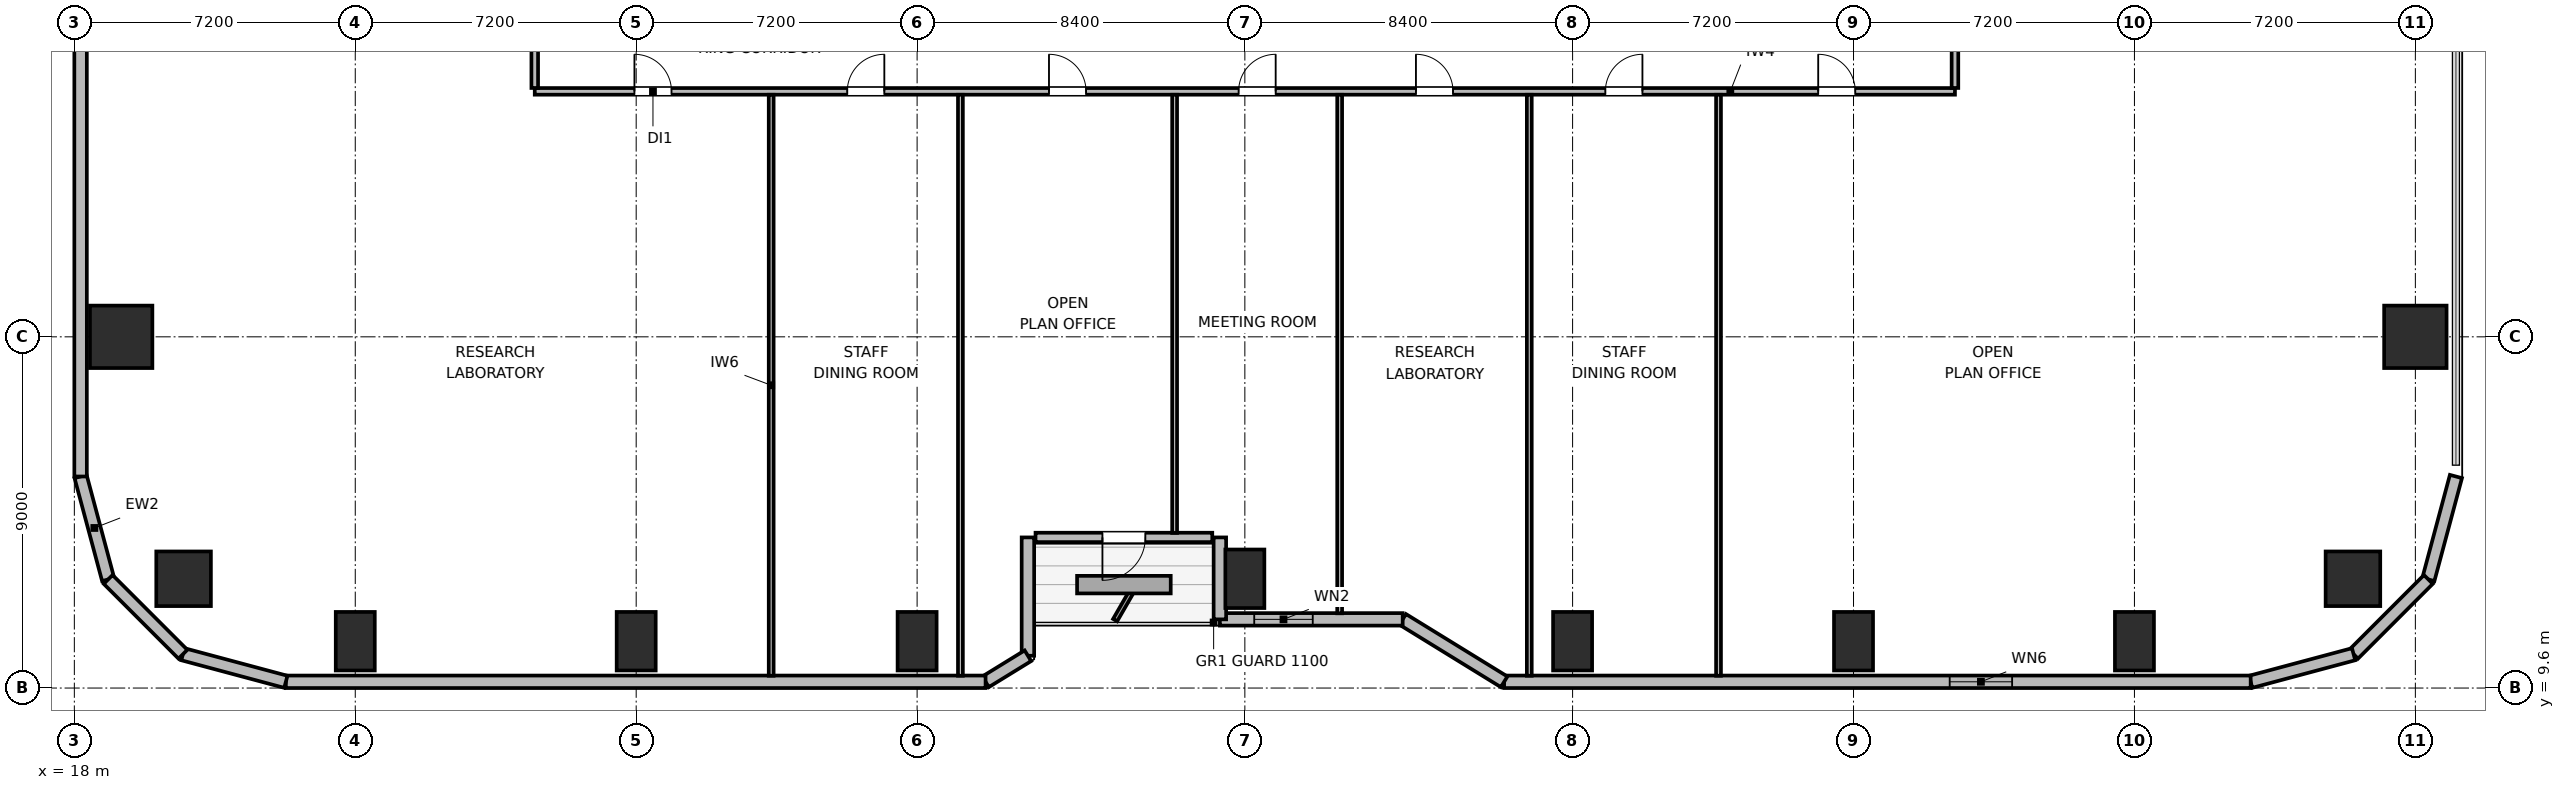
"""IFC4 building model, lengths in metres.
Left out: names, types, materials, properties, quantities, classifications, styles, units other than length and angle.
Written with IfcOpenShell. Run it as: python <this file> out.ifc"""

import sys

from ifc_helpers import new_model, si_unit, direction, frame, frame_2d, origin, origin_2d, place, context, subcontext, project, spatial, rectangle, circle, extrude, element, fill, save


model = new_model("IFC4")
c1 = context("Model", 3, precision=1e-05, world=origin(), true_north=direction((0.0, 1.0)))
c2 = subcontext(c1, "Body", "Model", "MODEL_VIEW")
j1 = project(units=[si_unit("LENGTHUNIT", "METRE"), si_unit("PLANEANGLEUNIT", "RADIAN")], contexts=[c1])
p1 = place(None, origin())
s1 = spatial("IfcSite", under=j1, at=p1, CompositionType="ELEMENT")
p2 = place(p1, origin())
s2 = spatial("IfcBuilding", under=s1, at=p2, CompositionType="ELEMENT")
p3 = place(p2, frame((0.0, 0.0, 45.0)))
s3 = spatial("IfcBuildingStorey", under=s2, at=p3, CompositionType="ELEMENT", Elevation=45.0)
for number, where, z_axis, x_axis in (
    (1, (20.8, 12.4, 0.0), (0.0, 0.0, 1.0), (1.0, 0.0, 0.0)),
    (2, (76.4, 12.4, 0.0), (0.0, 0.0, 1.0), (1.0, 0.0, 0.0)),
):
    element("IfcColumn", number, at=place(p3, frame(where, z_axis=z_axis, x_axis=x_axis)), inside=s3, PredefinedType="COLUMN", context=c2, shape_type="SweptSolid", body=[
        extrude(circle(Radius=0.7, at=origin_2d()), origin(), (0.0, 0.0, 1.0), 3.9),
    ])
for number, where, z_axis, x_axis in (
    (3, (25.2, 10.8, 0.0), (0.0, 0.0, 1.0), (1.0, 0.0, 0.0)),
    (4, (32.4, 10.8, 0.0), (0.0, 0.0, 1.0), (1.0, 0.0, 0.0)),
    (5, (39.6, 10.8, 0.0), (0.0, 0.0, 1.0), (1.0, 0.0, 0.0)),
    (6, (48.0, 12.4, 0.0), (0.0, 0.0, 1.0), (1.0, 0.0, 0.0)),
    (7, (56.4, 10.8, 0.0), (0.0, 0.0, 1.0), (1.0, 0.0, 0.0)),
    (8, (63.6, 10.8, 0.0), (0.0, 0.0, 1.0), (1.0, 0.0, 0.0)),
    (9, (70.8, 10.8, 0.0), (0.0, 0.0, 1.0), (1.0, 0.0, 0.0)),
):
    element("IfcColumn", number, at=place(p3, frame(where, z_axis=z_axis, x_axis=x_axis)), inside=s3, PredefinedType="COLUMN", context=c2, shape_type="SweptSolid", body=[
        extrude(rectangle(XDim=1.0, YDim=1.5, at=origin_2d()), origin(), (0.0, 0.0, 1.0), 3.9),
    ])
for number, where, z_axis, x_axis in (
    (10, (19.2, 18.6, 0.0), (0.0, 0.0, 1.0), (1.0, 0.0, 0.0)),
    (11, (78.0, 18.6, 0.0), (0.0, 0.0, 1.0), (1.0, 0.0, 0.0)),
):
    element("IfcColumn", number, at=place(p3, frame(where, z_axis=z_axis, x_axis=x_axis)), inside=s3, PredefinedType="COLUMN", context=c2, shape_type="SweptSolid", body=[
        extrude(rectangle(XDim=1.6, YDim=1.6, at=origin_2d()), origin(), (0.0, 0.0, 1.0), 3.9),
    ])
p4 = place(p3, frame((18.866, 12.383, 0.0), z_axis=(0.0, 0.0, 1.0), x_axis=(-0.25869736047, 0.965958423373, 0.0)))
e12 = element("IfcWall", 12, at=p4, inside=s3, PredefinedType="SOLIDWALL", context=c2, shape_type="SweptSolid", body=[
    extrude(rectangle(XDim=2.731, YDim=0.32, at=frame_2d((1.366, 0.0))), origin(), (0.0, 0.0, 1.0), 3.64),
])
p5 = place(p3, frame((18.16, 15.021, 0.0), z_axis=(0.0, 0.0, 1.0), x_axis=(0.0, 1.0, 0.0)))
e13 = element("IfcWall", 13, at=p5, inside=s3, PredefinedType="SOLIDWALL", context=c2, shape_type="SweptSolid", body=[
    extrude(rectangle(XDim=14.219, YDim=0.32, at=frame_2d((7.109, 0.0))), origin(), (0.0, 0.0, 1.0), 3.64),
])
p6 = place(p3, frame((79.04, 15.021, 0.0), z_axis=(0.0, 0.0, 1.0), x_axis=(-0.25869736047, -0.965958423373, 0.0)))
e14 = element("IfcWall", 14, at=p6, inside=s3, PredefinedType="SOLIDWALL", context=c2, shape_type="SweptSolid", body=[
    extrude(rectangle(XDim=2.731, YDim=0.32, at=frame_2d((1.366, 0.0))), origin(), (0.0, 0.0, 1.0), 3.64),
])
p7 = place(p3, frame((78.333, 12.383, 0.0), z_axis=(0.0, 0.0, 1.0), x_axis=(-0.707106781187, -0.707106781187, 0.0)))
e15 = element("IfcWall", 15, at=p7, inside=s3, PredefinedType="SOLIDWALL", context=c2, shape_type="SweptSolid", body=[
    extrude(rectangle(XDim=2.71, YDim=0.32, at=frame_2d((1.355, 0.0))), origin(), (0.0, 0.0, 1.0), 3.64),
])
p8 = place(p3, frame((76.417, 10.467, 0.0), z_axis=(0.0, 0.0, 1.0), x_axis=(-0.965964405026, -0.25867502435, 0.0)))
e16 = element("IfcWall", 16, at=p8, inside=s3, PredefinedType="SOLIDWALL", context=c2, shape_type="SweptSolid", body=[
    extrude(rectangle(XDim=2.731, YDim=0.32, at=frame_2d((1.366, 0.0))), origin(), (0.0, 0.0, 1.0), 3.64),
])
p9 = place(p3, frame((73.779, 9.76, 0.0), z_axis=(0.0, 0.0, 1.0), x_axis=(-1.0, 0.0, 0.0)))
e17 = element("IfcWall", 17, at=p9, inside=s3, PredefinedType="SOLIDWALL", context=c2, shape_type="SweptSolid", body=[
    extrude(rectangle(XDim=19.134, YDim=0.32, at=frame_2d((9.567, 0.0))), origin(), (0.0, 0.0, 1.0), 3.64),
])
p10 = place(p9, frame((6.114, 0.0, 0.85)))
e18 = element("IfcOpeningElement", 18, at=p10, cuts=e17, PredefinedType="OPENING", context=c2, shape_type="SweptSolid", body=[
    extrude(rectangle(XDim=1.6, YDim=1.0, at=frame_2d((0.8, 0.5))), frame((0.0, 0.17, 0.0), z_axis=(0.0, -1.0, 0.0), x_axis=(1.0, 0.0, 0.0)), (0.0, 0.0, 1.0), 0.34),
])
p11 = place(p3, frame((54.645, 9.76, 0.0), z_axis=(0.0, 0.0, 1.0), x_axis=(-0.851630857047, 0.524142044989, 0.0)))
e19 = element("IfcWall", 19, at=p11, inside=s3, PredefinedType="SOLIDWALL", context=c2, shape_type="SweptSolid", body=[
    extrude(rectangle(XDim=3.053, YDim=0.32, at=frame_2d((1.526, 0.0))), origin(), (0.0, 0.0, 1.0), 2.875),
])
p12 = place(p3, frame((52.045, 11.36, 0.0), z_axis=(0.0, 0.0, 1.0), x_axis=(-1.0, 0.0, 0.0)))
e20 = element("IfcWall", 20, at=p12, inside=s3, PredefinedType="SOLIDWALL", context=c2, shape_type="SweptSolid", body=[
    extrude(rectangle(XDim=4.685, YDim=0.32, at=frame_2d((2.343, 0.0))), origin(), (0.0, 0.0, 1.0), 2.875),
])
p13 = place(p12, frame((2.305, 0.0, 0.85)))
e21 = element("IfcOpeningElement", 21, at=p13, cuts=e20, PredefinedType="OPENING", context=c2, shape_type="SweptSolid", body=[
    extrude(rectangle(XDim=1.5, YDim=1.1, at=frame_2d((0.75, 0.55))), frame((0.0, 0.17, 0.0), z_axis=(0.0, -1.0, 0.0), x_axis=(1.0, 0.0, 0.0)), (0.0, 0.0, 1.0), 0.34),
])
p14 = place(p3, frame((47.36, 11.36, 0.0), z_axis=(0.0, 0.0, 1.0), x_axis=(0.0, 1.0, 0.0)))
e22 = element("IfcWall", 22, at=p14, inside=s3, PredefinedType="SOLIDWALL", context=c2, shape_type="SweptSolid", body=[
    extrude(rectangle(XDim=2.1, YDim=0.32, at=frame_2d((1.05, 0.0))), origin(), (0.0, 0.0, 1.0), 2.875),
])
p15 = place(p3, frame((47.165, 13.46, 0.0), z_axis=(0.0, 0.0, 1.0), x_axis=(-1.0, 0.0, 0.0)))
e23 = element("IfcWall", 23, at=p15, inside=s3, PredefinedType="SOLIDWALL", context=c2, shape_type="SweptSolid", body=[
    extrude(rectangle(XDim=4.53, YDim=0.24, at=frame_2d((2.265, 0.0))), origin(), (0.0, 0.0, 1.0), 3.64),
])
p16 = place(p15, frame((1.715, 0.0, 0.0)))
e24 = element("IfcOpeningElement", 24, at=p16, cuts=e23, PredefinedType="OPENING", context=c2, shape_type="SweptSolid", body=[
    extrude(rectangle(XDim=1.1, YDim=2.04, at=frame_2d((0.55, 1.02))), frame((0.0, 0.13, 0.0), z_axis=(0.0, -1.0, 0.0), x_axis=(1.0, 0.0, 0.0)), (0.0, 0.0, 1.0), 0.26),
])
p17 = place(p3, frame((42.44, 13.46, 0.0), z_axis=(0.0, 0.0, 1.0), x_axis=(0.0, -1.0, 0.0)))
e25 = element("IfcWall", 25, at=p17, inside=s3, PredefinedType="SOLIDWALL", context=c2, shape_type="SweptSolid", body=[
    extrude(rectangle(XDim=3.032, YDim=0.32, at=frame_2d((1.516, 0.0))), origin(), (0.0, 0.0, 1.0), 2.875),
])
p18 = place(p3, frame((42.44, 10.427, 0.0), z_axis=(0.0, 0.0, 1.0), x_axis=(-0.851776724646, -0.523904964045, 0.0)))
e26 = element("IfcWall", 26, at=p18, inside=s3, PredefinedType="SOLIDWALL", context=c2, shape_type="SweptSolid", body=[
    extrude(rectangle(XDim=1.274, YDim=0.32, at=frame_2d((0.637, 0.0))), origin(), (0.0, 0.0, 1.0), 3.64),
])
p19 = place(p3, frame((41.355, 9.76, 0.0), z_axis=(0.0, 0.0, 1.0), x_axis=(-1.0, 0.0, 0.0)))
e27 = element("IfcWall", 27, at=p19, inside=s3, PredefinedType="SOLIDWALL", context=c2, shape_type="SweptSolid", body=[
    extrude(rectangle(XDim=17.934, YDim=0.32, at=frame_2d((8.967, 0.0))), origin(), (0.0, 0.0, 1.0), 3.64),
])
p20 = place(p3, frame((23.421, 9.76, 0.0), z_axis=(0.0, 0.0, 1.0), x_axis=(-0.965964405026, 0.25867502435, 0.0)))
e28 = element("IfcWall", 28, at=p20, inside=s3, PredefinedType="SOLIDWALL", context=c2, shape_type="SweptSolid", body=[
    extrude(rectangle(XDim=2.731, YDim=0.32, at=frame_2d((1.366, 0.0))), origin(), (0.0, 0.0, 1.0), 3.64),
])
p21 = place(p3, frame((20.783, 10.467, 0.0), z_axis=(0.0, 0.0, 1.0), x_axis=(-0.707106781187, 0.707106781187, 0.0)))
e29 = element("IfcWall", 29, at=p21, inside=s3, PredefinedType="SOLIDWALL", context=c2, shape_type="SweptSolid", body=[
    extrude(rectangle(XDim=2.71, YDim=0.32, at=frame_2d((1.355, 0.0))), origin(), (0.0, 0.0, 1.0), 3.64),
])
p22 = place(p3, frame((29.8, 24.89, 0.0), z_axis=(0.0, 0.0, 1.0), x_axis=(1.0, 0.0, 0.0)))
e30 = element("IfcWall", 30, at=p22, inside=s3, PredefinedType="PARTITIONING", context=c2, shape_type="SweptSolid", body=[
    extrude(rectangle(XDim=36.4, YDim=0.17, at=frame_2d((18.2, 0.0))), origin(), (0.0, 0.0, 1.0), 3.64),
])
p23 = place(p22, frame((2.555, 0.0, 0.0)))
e31 = element("IfcOpeningElement", 31, at=p23, cuts=e30, PredefinedType="OPENING", context=c2, shape_type="SweptSolid", body=[
    extrude(rectangle(XDim=0.95, YDim=2.04, at=frame_2d((0.475, 1.02))), frame((0.0, 0.095, 0.0), z_axis=(0.0, -1.0, 0.0), x_axis=(1.0, 0.0, 0.0)), (0.0, 0.0, 1.0), 0.19),
])
p24 = place(p22, frame((8.01, 0.0, 0.0)))
e32 = element("IfcOpeningElement", 32, at=p24, cuts=e30, PredefinedType="OPENING", context=c2, shape_type="SweptSolid", body=[
    extrude(rectangle(XDim=0.95, YDim=2.04, at=frame_2d((0.475, 1.02))), frame((0.0, 0.095, 0.0), z_axis=(0.0, -1.0, 0.0), x_axis=(1.0, 0.0, 0.0)), (0.0, 0.0, 1.0), 0.19),
])
p25 = place(p22, frame((13.18, 0.0, 0.0)))
e33 = element("IfcOpeningElement", 33, at=p25, cuts=e30, PredefinedType="OPENING", context=c2, shape_type="SweptSolid", body=[
    extrude(rectangle(XDim=0.95, YDim=2.04, at=frame_2d((0.475, 1.02))), frame((0.0, 0.095, 0.0), z_axis=(0.0, -1.0, 0.0), x_axis=(1.0, 0.0, 0.0)), (0.0, 0.0, 1.0), 0.19),
])
p26 = place(p22, frame((18.04, 0.0, 0.0)))
e34 = element("IfcOpeningElement", 34, at=p26, cuts=e30, PredefinedType="OPENING", context=c2, shape_type="SweptSolid", body=[
    extrude(rectangle(XDim=0.95, YDim=2.04, at=frame_2d((0.475, 1.02))), frame((0.0, 0.095, 0.0), z_axis=(0.0, -1.0, 0.0), x_axis=(1.0, 0.0, 0.0)), (0.0, 0.0, 1.0), 0.19),
])
p27 = place(p22, frame((22.585, 0.0, 0.0)))
e35 = element("IfcOpeningElement", 35, at=p27, cuts=e30, PredefinedType="OPENING", context=c2, shape_type="SweptSolid", body=[
    extrude(rectangle(XDim=0.95, YDim=2.04, at=frame_2d((0.475, 1.02))), frame((0.0, 0.095, 0.0), z_axis=(0.0, -1.0, 0.0), x_axis=(1.0, 0.0, 0.0)), (0.0, 0.0, 1.0), 0.19),
])
p28 = place(p22, frame((27.44, 0.0, 0.0)))
e36 = element("IfcOpeningElement", 36, at=p28, cuts=e30, PredefinedType="OPENING", context=c2, shape_type="SweptSolid", body=[
    extrude(rectangle(XDim=0.95, YDim=2.04, at=frame_2d((0.475, 1.02))), frame((0.0, 0.095, 0.0), z_axis=(0.0, -1.0, 0.0), x_axis=(1.0, 0.0, 0.0)), (0.0, 0.0, 1.0), 0.19),
])
p29 = place(p22, frame((32.895, 0.0, 0.0)))
e37 = element("IfcOpeningElement", 37, at=p29, cuts=e30, PredefinedType="OPENING", context=c2, shape_type="SweptSolid", body=[
    extrude(rectangle(XDim=0.95, YDim=2.04, at=frame_2d((0.475, 1.02))), frame((0.0, 0.095, 0.0), z_axis=(0.0, -1.0, 0.0), x_axis=(1.0, 0.0, 0.0)), (0.0, 0.0, 1.0), 0.19),
])
p30 = place(p3, frame((29.8, 24.977, 0.0), z_axis=(0.0, 0.0, 1.0), x_axis=(0.0, 1.0, 0.0)))
e38 = element("IfcWall", 38, at=p30, inside=s3, PredefinedType="PARTITIONING", context=c2, shape_type="SweptSolid", body=[
    extrude(rectangle(XDim=22.046, YDim=0.17, at=frame_2d((11.023, 0.0))), origin(), (0.0, 0.0, 1.0), 3.64),
])
p31 = place(p30, frame((10.548, 0.0, 0.0)))
e39 = element("IfcOpeningElement", 39, at=p31, cuts=e38, PredefinedType="OPENING", context=c2, shape_type="SweptSolid", body=[
    extrude(rectangle(XDim=0.95, YDim=2.04, at=frame_2d((0.475, 1.02))), frame((0.0, 0.095, 0.0), z_axis=(0.0, -1.0, 0.0), x_axis=(1.0, 0.0, 0.0)), (0.0, 0.0, 1.0), 0.19),
])
p32 = place(p3, frame((66.2, 24.977, 0.0), z_axis=(0.0, 0.0, 1.0), x_axis=(0.0, 1.0, 0.0)))
e40 = element("IfcWall", 40, at=p32, inside=s3, PredefinedType="PARTITIONING", context=c2, shape_type="SweptSolid", body=[
    extrude(rectangle(XDim=22.046, YDim=0.17, at=frame_2d((11.023, 0.0))), origin(), (0.0, 0.0, 1.0), 3.64),
])
p33 = place(p32, frame((4.493, 0.0, 0.0)))
e41 = element("IfcOpeningElement", 41, at=p33, cuts=e40, PredefinedType="OPENING", context=c2, shape_type="SweptSolid", body=[
    extrude(rectangle(XDim=0.95, YDim=2.04, at=frame_2d((0.475, 1.02))), frame((0.0, 0.095, 0.0), z_axis=(0.0, -1.0, 0.0), x_axis=(1.0, 0.0, 0.0)), (0.0, 0.0, 1.0), 0.19),
])
p34 = place(p32, frame((15.603, 0.0, 0.0)))
e42 = element("IfcOpeningElement", 42, at=p34, cuts=e40, PredefinedType="OPENING", context=c2, shape_type="SweptSolid", body=[
    extrude(rectangle(XDim=0.95, YDim=2.04, at=frame_2d((0.475, 1.02))), frame((0.0, 0.095, 0.0), z_axis=(0.0, -1.0, 0.0), x_axis=(1.0, 0.0, 0.0)), (0.0, 0.0, 1.0), 0.19),
])
p35 = place(p3, frame((35.86, 9.915, 0.0), z_axis=(0.0, 0.0, 1.0), x_axis=(0.0, 1.0, 0.0)))
e43 = element("IfcWall", 43, at=p35, inside=s3, PredefinedType="PARTITIONING", context=c2, shape_type="SweptSolid", body=[
    extrude(rectangle(XDim=14.888, YDim=0.125, at=frame_2d((7.444, 0.0))), origin(), (0.0, 0.0, 1.0), 3.64),
])
p36 = place(p3, frame((40.71, 9.915, 0.0), z_axis=(0.0, 0.0, 1.0), x_axis=(0.0, 1.0, 0.0)))
e44 = element("IfcWall", 44, at=p36, inside=s3, PredefinedType="PARTITIONING", context=c2, shape_type="SweptSolid", body=[
    extrude(rectangle(XDim=14.888, YDim=0.125, at=frame_2d((7.444, 0.0))), origin(), (0.0, 0.0, 1.0), 3.003),
])
p37 = place(p3, frame((46.2, 13.575, 0.0), z_axis=(0.0, 0.0, 1.0), x_axis=(0.0, 1.0, 0.0)))
e45 = element("IfcWall", 45, at=p37, inside=s3, PredefinedType="PARTITIONING", context=c2, shape_type="SweptSolid", body=[
    extrude(rectangle(XDim=11.228, YDim=0.125, at=frame_2d((5.614, 0.0))), origin(), (0.0, 0.0, 1.0), 3.64),
])
p38 = place(p3, frame((50.43, 11.515, 0.0), z_axis=(0.0, 0.0, 1.0), x_axis=(0.0, 1.0, 0.0)))
e46 = element("IfcWall", 46, at=p38, inside=s3, PredefinedType="PARTITIONING", context=c2, shape_type="SweptSolid", body=[
    extrude(rectangle(XDim=13.288, YDim=0.125, at=frame_2d((6.644, 0.0))), origin(), (0.0, 0.0, 1.0), 3.64),
])
p39 = place(p3, frame((55.29, 9.915, 0.0), z_axis=(0.0, 0.0, 1.0), x_axis=(0.0, 1.0, 0.0)))
e47 = element("IfcWall", 47, at=p39, inside=s3, PredefinedType="PARTITIONING", context=c2, shape_type="SweptSolid", body=[
    extrude(rectangle(XDim=14.888, YDim=0.125, at=frame_2d((7.444, 0.0))), origin(), (0.0, 0.0, 1.0), 3.003),
])
p40 = place(p3, frame((60.14, 9.915, 0.0), z_axis=(0.0, 0.0, 1.0), x_axis=(0.0, 1.0, 0.0)))
e48 = element("IfcWall", 48, at=p40, inside=s3, PredefinedType="PARTITIONING", context=c2, shape_type="SweptSolid", body=[
    extrude(rectangle(XDim=14.888, YDim=0.125, at=frame_2d((7.444, 0.0))), origin(), (0.0, 0.0, 1.0), 3.64),
])
p41 = place(p10, origin())
e49 = element("IfcWindow", 49, at=p41, inside=s3, PartitioningType="SINGLE_PANEL", PredefinedType="WINDOW", context=c2, shape_type="SweptSolid", body=[
    extrude(rectangle(XDim=1.6, YDim=1.0, at=frame_2d((0.8, 0.5))), frame((0.0, 0.03, 0.0), z_axis=(0.0, -1.0, 0.0), x_axis=(1.0, 0.0, 0.0)), (0.0, 0.0, 1.0), 0.06),
])
fill(e18, e49)
p42 = place(p13, origin())
e50 = element("IfcWindow", 50, at=p42, inside=s3, PartitioningType="SINGLE_PANEL", PredefinedType="WINDOW", context=c2, shape_type="SweptSolid", body=[
    extrude(rectangle(XDim=1.5, YDim=1.1, at=frame_2d((0.75, 0.55))), frame((0.0, 0.03, 0.0), z_axis=(0.0, -1.0, 0.0), x_axis=(1.0, 0.0, 0.0)), (0.0, 0.0, 1.0), 0.06),
])
fill(e21, e50)
p43 = place(p16, origin())
e51 = element("IfcDoor", 51, at=p43, inside=s3, OperationType="SINGLE_SWING_RIGHT", PredefinedType="DOOR", context=c2, shape_type="SweptSolid", body=[
    extrude(rectangle(XDim=1.1, YDim=2.04, at=frame_2d((0.55, 1.02))), frame((0.0, 0.025, 0.0), z_axis=(0.0, -1.0, 0.0), x_axis=(1.0, 0.0, 0.0)), (0.0, 0.0, 1.0), 0.05),
])
fill(e24, e51)
p44 = place(p23, origin())
e52 = element("IfcDoor", 52, at=p44, inside=s3, OperationType="SINGLE_SWING_LEFT", PredefinedType="DOOR", context=c2, shape_type="SweptSolid", body=[
    extrude(rectangle(XDim=0.95, YDim=2.04, at=frame_2d((0.475, 1.02))), frame((0.0, 0.025, 0.0), z_axis=(0.0, -1.0, 0.0), x_axis=(1.0, 0.0, 0.0)), (0.0, 0.0, 1.0), 0.05),
])
fill(e31, e52)
p45 = place(p24, origin())
e53 = element("IfcDoor", 53, at=p45, inside=s3, OperationType="SINGLE_SWING_RIGHT", PredefinedType="DOOR", context=c2, shape_type="SweptSolid", body=[
    extrude(rectangle(XDim=0.95, YDim=2.04, at=frame_2d((0.475, 1.02))), frame((0.0, 0.025, 0.0), z_axis=(0.0, -1.0, 0.0), x_axis=(1.0, 0.0, 0.0)), (0.0, 0.0, 1.0), 0.05),
])
fill(e32, e53)
p46 = place(p25, origin())
e54 = element("IfcDoor", 54, at=p46, inside=s3, OperationType="SINGLE_SWING_LEFT", PredefinedType="DOOR", context=c2, shape_type="SweptSolid", body=[
    extrude(rectangle(XDim=0.95, YDim=2.04, at=frame_2d((0.475, 1.02))), frame((0.0, 0.025, 0.0), z_axis=(0.0, -1.0, 0.0), x_axis=(1.0, 0.0, 0.0)), (0.0, 0.0, 1.0), 0.05),
])
fill(e33, e54)
p47 = place(p26, origin())
e55 = element("IfcDoor", 55, at=p47, inside=s3, OperationType="SINGLE_SWING_RIGHT", PredefinedType="DOOR", context=c2, shape_type="SweptSolid", body=[
    extrude(rectangle(XDim=0.95, YDim=2.04, at=frame_2d((0.475, 1.02))), frame((0.0, 0.025, 0.0), z_axis=(0.0, -1.0, 0.0), x_axis=(1.0, 0.0, 0.0)), (0.0, 0.0, 1.0), 0.05),
])
fill(e34, e55)
p48 = place(p27, origin())
e56 = element("IfcDoor", 56, at=p48, inside=s3, OperationType="SINGLE_SWING_LEFT", PredefinedType="DOOR", context=c2, shape_type="SweptSolid", body=[
    extrude(rectangle(XDim=0.95, YDim=2.04, at=frame_2d((0.475, 1.02))), frame((0.0, 0.025, 0.0), z_axis=(0.0, -1.0, 0.0), x_axis=(1.0, 0.0, 0.0)), (0.0, 0.0, 1.0), 0.05),
])
fill(e35, e56)
p49 = place(p28, origin())
e57 = element("IfcDoor", 57, at=p49, inside=s3, OperationType="SINGLE_SWING_RIGHT", PredefinedType="DOOR", context=c2, shape_type="SweptSolid", body=[
    extrude(rectangle(XDim=0.95, YDim=2.04, at=frame_2d((0.475, 1.02))), frame((0.0, 0.025, 0.0), z_axis=(0.0, -1.0, 0.0), x_axis=(1.0, 0.0, 0.0)), (0.0, 0.0, 1.0), 0.05),
])
fill(e36, e57)
p50 = place(p29, origin())
e58 = element("IfcDoor", 58, at=p50, inside=s3, OperationType="SINGLE_SWING_LEFT", PredefinedType="DOOR", context=c2, shape_type="SweptSolid", body=[
    extrude(rectangle(XDim=0.95, YDim=2.04, at=frame_2d((0.475, 1.02))), frame((0.0, 0.025, 0.0), z_axis=(0.0, -1.0, 0.0), x_axis=(1.0, 0.0, 0.0)), (0.0, 0.0, 1.0), 0.05),
])
fill(e37, e58)
save(model, sys.argv[1])
